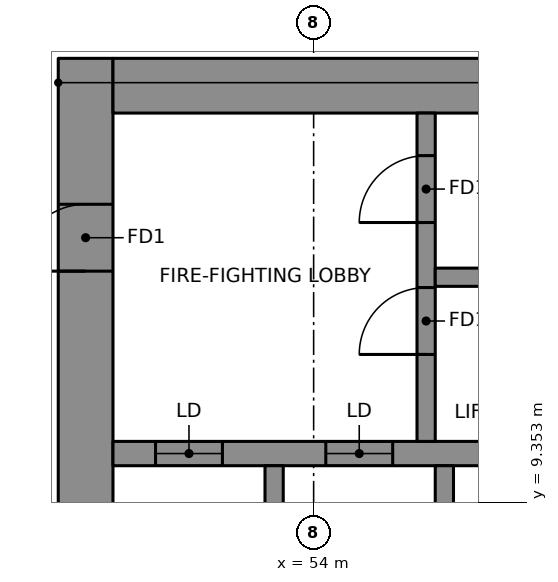
"""IFC4 building model, lengths in metres.
Left out: names, types, materials, properties, quantities, classifications, styles, units other than length and angle.
Written with IfcOpenShell. Run it as: python <this file> out.ifc"""

import sys

from ifc_helpers import new_model, si_unit, direction, frame, frame_2d, origin, place, context, subcontext, project, spatial, rectangle, extrude, element, fill, save


model = new_model("IFC4")
c1 = context("Model", 3, precision=1e-05, world=origin(), true_north=direction((0.0, 1.0)))
c2 = subcontext(c1, "Body", "Model", "MODEL_VIEW")
j1 = project(units=[si_unit("LENGTHUNIT", "METRE"), si_unit("PLANEANGLEUNIT", "RADIAN")], contexts=[c1])
p1 = place(None, origin())
s1 = spatial("IfcSite", under=j1, at=p1, CompositionType="ELEMENT")
p2 = place(p1, origin())
s2 = spatial("IfcBuilding", under=s1, at=p2, CompositionType="ELEMENT")
p3 = place(p2, frame((0.0, 0.0, 162.15)))
s3 = spatial("IfcBuildingStorey", under=s2, at=p3, CompositionType="ELEMENT", Elevation=162.15)
p4 = place(p3, frame((50.25, 6.65, 0.0), z_axis=(0.0, 0.0, 1.0), x_axis=(0.0, 1.0, 0.0)))
e1 = element("IfcWall", 1, at=p4, inside=s3, PredefinedType="SHEAR", context=c2, shape_type="SweptSolid", body=[
    extrude(rectangle(XDim=10.0, YDim=0.9, at=frame_2d((5.0, 0.0))), origin(), (0.0, 0.0, 1.0), 3.55),
])
p5 = place(p4, frame((6.5, 0.0, 0.0)))
e2 = element("IfcOpeningElement", 2, at=p5, cuts=e1, PredefinedType="OPENING", context=c2, shape_type="SweptSolid", body=[
    extrude(rectangle(XDim=1.1, YDim=2.1, at=frame_2d((0.55, 1.05))), frame((0.0, 0.46, 0.0), z_axis=(0.0, -1.0, 0.0), x_axis=(1.0, 0.0, 0.0)), (0.0, 0.0, 1.0), 0.92),
])
p6 = place(p3, frame((50.7, 16.2, 0.0), z_axis=(0.0, 0.0, 1.0), x_axis=(1.0, 0.0, 0.0)))
e3 = element("IfcWall", 3, at=p6, inside=s3, PredefinedType="SHEAR", context=c2, shape_type="SweptSolid", body=[
    extrude(rectangle(XDim=13.92, YDim=0.9, at=frame_2d((6.96, 0.0))), origin(), (0.0, 0.0, 1.0), 3.55),
])
p7 = place(p3, frame((50.7, 10.15, 0.0), z_axis=(0.0, 0.0, 1.0), x_axis=(1.0, 0.0, 0.0)))
e4 = element("IfcWall", 4, at=p7, inside=s3, PredefinedType="SHEAR", context=c2, shape_type="SweptSolid", body=[
    extrude(rectangle(XDim=13.02, YDim=0.4, at=frame_2d((6.51, 0.0))), origin(), (0.0, 0.0, 1.0), 3.55),
])
p8 = place(p7, frame((0.7, 0.0, 0.0)))
e5 = element("IfcOpeningElement", 5, at=p8, cuts=e4, PredefinedType="OPENING", context=c2, shape_type="SweptSolid", body=[
    extrude(rectangle(XDim=1.1, YDim=2.1, at=frame_2d((0.55, 1.05))), frame((0.0, 0.21, 0.0), z_axis=(0.0, -1.0, 0.0), x_axis=(1.0, 0.0, 0.0)), (0.0, 0.0, 1.0), 0.42),
])
p9 = place(p7, frame((3.5, 0.0, 0.0)))
e6 = element("IfcOpeningElement", 6, at=p9, cuts=e4, PredefinedType="OPENING", context=c2, shape_type="SweptSolid", body=[
    extrude(rectangle(XDim=1.1, YDim=2.1, at=frame_2d((0.55, 1.05))), frame((0.0, 0.21, 0.0), z_axis=(0.0, -1.0, 0.0), x_axis=(1.0, 0.0, 0.0)), (0.0, 0.0, 1.0), 0.42),
])
for number, where, z_axis, x_axis in (
    (7, (53.35, 6.95, 0.0), (0.0, 0.0, 1.0), (0.0, 1.0, 0.0)),
    (8, (56.15, 6.95, 0.0), (0.0, 0.0, 1.0), (0.0, 1.0, 0.0)),
):
    element("IfcWall", number, at=place(p3, frame(where, z_axis=z_axis, x_axis=x_axis)), inside=s3, PredefinedType="SHEAR", context=c2, shape_type="SweptSolid", body=[
        extrude(rectangle(XDim=3.0, YDim=0.3, at=frame_2d((1.5, 0.0))), origin(), (0.0, 0.0, 1.0), 3.55),
    ])
p10 = place(p3, frame((55.85, 10.35, 0.0), z_axis=(0.0, 0.0, 1.0), x_axis=(0.0, 1.0, 0.0)))
e9 = element("IfcWall", 9, at=p10, inside=s3, PredefinedType="SHEAR", context=c2, shape_type="SweptSolid", body=[
    extrude(rectangle(XDim=5.4, YDim=0.3, at=frame_2d((2.7, 0.0))), origin(), (0.0, 0.0, 1.0), 3.55),
])
p11 = place(p10, frame((1.43, 0.0, 0.0)))
e10 = element("IfcOpeningElement", 10, at=p11, cuts=e9, PredefinedType="OPENING", context=c2, shape_type="SweptSolid", body=[
    extrude(rectangle(XDim=1.1, YDim=2.1, at=frame_2d((0.55, 1.05))), frame((0.0, 0.16, 0.0), z_axis=(0.0, -1.0, 0.0), x_axis=(1.0, 0.0, 0.0)), (0.0, 0.0, 1.0), 0.32),
])
p12 = place(p10, frame((3.6, 0.0, 0.0)))
e11 = element("IfcOpeningElement", 11, at=p12, cuts=e9, PredefinedType="OPENING", context=c2, shape_type="SweptSolid", body=[
    extrude(rectangle(XDim=1.1, YDim=2.1, at=frame_2d((0.55, 1.05))), frame((0.0, 0.16, 0.0), z_axis=(0.0, -1.0, 0.0), x_axis=(1.0, 0.0, 0.0)), (0.0, 0.0, 1.0), 0.32),
])
p13 = place(p3, frame((56.0, 13.05, 0.0), z_axis=(0.0, 0.0, 1.0), x_axis=(1.0, 0.0, 0.0)))
e12 = element("IfcWall", 12, at=p13, inside=s3, PredefinedType="SHEAR", context=c2, shape_type="SweptSolid", body=[
    extrude(rectangle(XDim=7.72, YDim=0.3, at=frame_2d((3.86, 0.0))), origin(), (0.0, 0.0, 1.0), 3.55),
])
p14 = place(p8, origin())
e13 = element("IfcDoor", 13, at=p14, inside=s3, OperationType="DOUBLE_DOOR_SLIDING", PredefinedType="DOOR", context=c2, shape_type="SweptSolid", body=[
    extrude(rectangle(XDim=1.1, YDim=2.1, at=frame_2d((0.55, 1.05))), frame((0.0, 0.025, 0.0), z_axis=(0.0, -1.0, 0.0), x_axis=(1.0, 0.0, 0.0)), (0.0, 0.0, 1.0), 0.05),
])
fill(e5, e13)
p15 = place(p9, origin())
e14 = element("IfcDoor", 14, at=p15, inside=s3, OperationType="DOUBLE_DOOR_SLIDING", PredefinedType="DOOR", context=c2, shape_type="SweptSolid", body=[
    extrude(rectangle(XDim=1.1, YDim=2.1, at=frame_2d((0.55, 1.05))), frame((0.0, 0.025, 0.0), z_axis=(0.0, -1.0, 0.0), x_axis=(1.0, 0.0, 0.0)), (0.0, 0.0, 1.0), 0.05),
])
fill(e6, e14)
p16 = place(p11, origin())
e15 = element("IfcDoor", 15, at=p16, inside=s3, OperationType="SINGLE_SWING_RIGHT", PredefinedType="DOOR", context=c2, shape_type="SweptSolid", body=[
    extrude(rectangle(XDim=1.1, YDim=2.1, at=frame_2d((0.55, 1.05))), frame((0.0, 0.025, 0.0), z_axis=(0.0, -1.0, 0.0), x_axis=(1.0, 0.0, 0.0)), (0.0, 0.0, 1.0), 0.05),
])
fill(e10, e15)
p17 = place(p12, origin())
e16 = element("IfcDoor", 16, at=p17, inside=s3, OperationType="SINGLE_SWING_RIGHT", PredefinedType="DOOR", context=c2, shape_type="SweptSolid", body=[
    extrude(rectangle(XDim=1.1, YDim=2.1, at=frame_2d((0.55, 1.05))), frame((0.0, 0.025, 0.0), z_axis=(0.0, -1.0, 0.0), x_axis=(1.0, 0.0, 0.0)), (0.0, 0.0, 1.0), 0.05),
])
fill(e11, e16)
p18 = place(p5, origin())
e17 = element("IfcDoor", 17, at=p18, inside=s3, OperationType="SINGLE_SWING_RIGHT", PredefinedType="DOOR", context=c2, shape_type="SweptSolid", body=[
    extrude(rectangle(XDim=1.1, YDim=2.1, at=frame_2d((0.55, 1.05))), frame((0.0, 0.025, 0.0), z_axis=(0.0, -1.0, 0.0), x_axis=(1.0, 0.0, 0.0)), (0.0, 0.0, 1.0), 0.05),
])
fill(e2, e17)
save(model, sys.argv[1])
